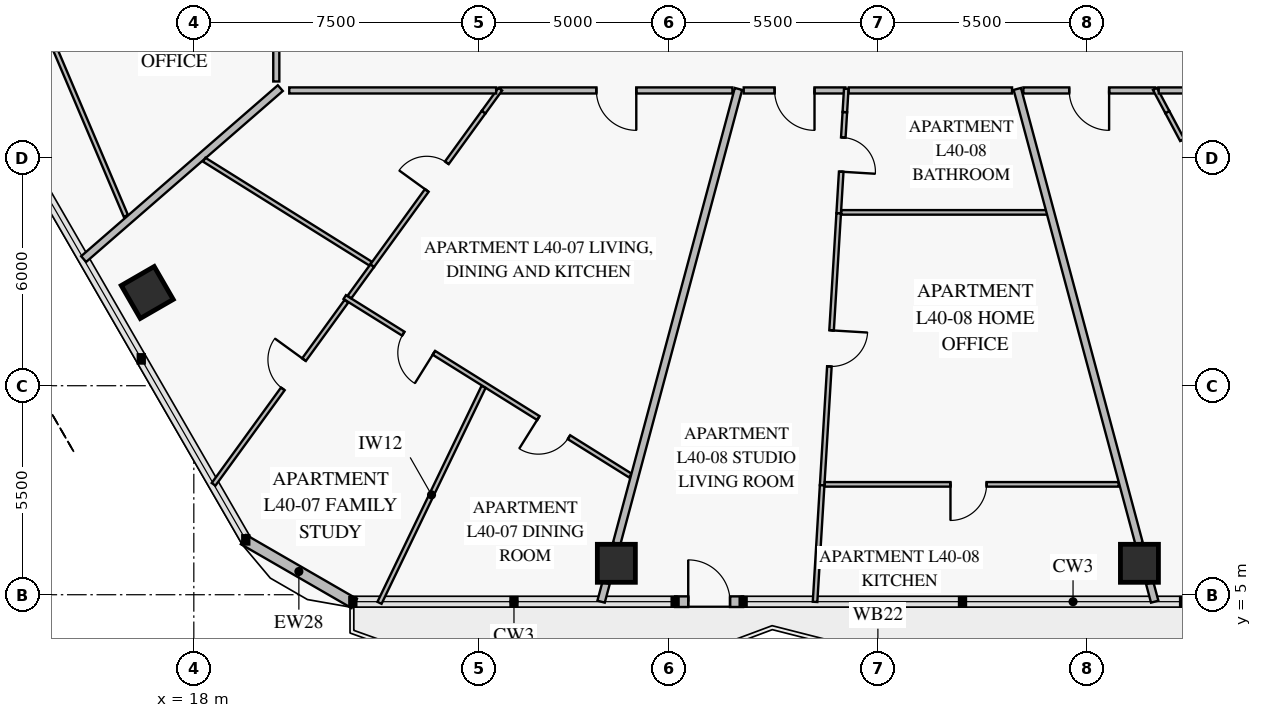
"""IFC4 building model, lengths in metres.
Left out: names, types, materials, properties, quantities, classifications, styles, units other than length and angle.
Written with IfcOpenShell. Run it as: python <this file> out.ifc"""

import sys

from ifc_helpers import new_model, si_unit, direction, frame, frame_2d, origin, origin_2d, place, context, subcontext, project, spatial, rectangle, extrude, element, fill, save


model = new_model("IFC4")
c1 = context("Model", 3, precision=1e-05, world=origin(), true_north=direction((0.0, 1.0)))
c2 = subcontext(c1, "Body", "Model", "MODEL_VIEW")
j1 = project(units=[si_unit("LENGTHUNIT", "METRE"), si_unit("PLANEANGLEUNIT", "RADIAN")], contexts=[c1])
p1 = place(None, origin())
s1 = spatial("IfcSite", under=j1, at=p1, CompositionType="ELEMENT")
p2 = place(p1, origin())
s2 = spatial("IfcBuilding", under=s1, at=p2, CompositionType="ELEMENT")
p3 = place(p2, frame((0.0, 0.0, 161.8)))
s3 = spatial("IfcBuildingStorey", under=s2, at=p3, CompositionType="ELEMENT", Elevation=161.8)
for number, where, z_axis, x_axis in (
    (1, (16.774, 12.953, 0.0), (0.0, 0.0, 1.0), (0.5, -0.866, 0.0)),
    (2, (29.118, 5.827, 0.0), (0.0, 0.0, 1.0), (1.0, 0.0, 0.0)),
    (3, (42.882, 5.827, 0.0), (0.0, 0.0, 1.0), (1.0, 0.0, 0.0)),
):
    element("IfcColumn", number, at=place(p3, frame(where, z_axis=z_axis, x_axis=x_axis)), inside=s3, PredefinedType="COLUMN", context=c2, shape_type="SweptSolid", body=[
        extrude(rectangle(XDim=1.0, YDim=1.0, at=origin_2d()), origin(), (0.0, 0.0, 1.0), 3.55),
    ])
p4 = place(p3, frame((32.454, 4.817, 0.0), z_axis=(0.0, 0.0, 1.0), x_axis=(-1.0, 0.0, 0.0)))
e4 = element("IfcWall", 4, at=p4, inside=s3, PredefinedType="SOLIDWALL", context=c2, shape_type="SweptSolid", body=[
    extrude(rectangle(XDim=1.79, YDim=0.28, at=frame_2d((0.895, 0.0))), origin(), (0.0, 0.0, 1.0), 3.55),
])
p5 = place(p4, frame((0.345, 0.0, 0.0)))
e5 = element("IfcOpeningElement", 5, at=p5, cuts=e4, PredefinedType="OPENING", context=c2, shape_type="SweptSolid", body=[
    extrude(rectangle(XDim=1.1, YDim=2.2, at=frame_2d((0.55, 1.1))), frame((0.0, 0.152, 0.0), z_axis=(0.0, -1.0, 0.0), x_axis=(1.0, 0.0, 0.0)), (0.0, 0.0, 1.0), 0.304),
])
p6 = place(p3, frame((22.221, 4.769, 0.0), z_axis=(0.0, 0.0, 1.0), x_axis=(-0.866020068361, 0.500009241111, 0.0)))
e6 = element("IfcWall", 6, at=p6, inside=s3, PredefinedType="SOLIDWALL", context=c2, shape_type="SweptSolid", body=[
    extrude(rectangle(XDim=3.365, YDim=0.28, at=frame_2d((1.683, 0.0))), origin(), (0.0, 0.0, 1.0), 3.55),
])
p7 = place(p3, frame((12.42, 23.901, 0.0), z_axis=(0.0, 0.0, 1.0), x_axis=(0.390728803852, -0.920505840199, 0.0)))
e7 = element("IfcWall", 7, at=p7, inside=s3, PredefinedType="PARTITIONING", context=c2, shape_type="SweptSolid", body=[
    extrude(rectangle(XDim=9.704, YDim=0.12, at=frame_2d((4.852, 0.0))), origin(), (0.0, 0.0, 1.0), 3.55),
])
p8 = place(p7, frame((2.533, 0.0, 0.0)))
e8 = element("IfcOpeningElement", 8, at=p8, cuts=e7, PredefinedType="OPENING", context=c2, shape_type="SweptSolid", body=[
    extrude(rectangle(XDim=0.95, YDim=2.1, at=frame_2d((0.475, 1.05))), frame((0.0, 0.072, 0.0), z_axis=(0.0, -1.0, 0.0), x_axis=(1.0, 0.0, 0.0)), (0.0, 0.0, 1.0), 0.144),
])
p9 = place(p3, frame((21.971, 12.833, 0.0), z_axis=(0.0, 0.0, 1.0), x_axis=(0.84804473337, -0.529924645779, 0.0)))
e9 = element("IfcWall", 9, at=p9, inside=s3, PredefinedType="PARTITIONING", context=c2, shape_type="SweptSolid", body=[
    extrude(rectangle(XDim=8.862, YDim=0.12, at=frame_2d((4.431, 0.0))), origin(), (0.0, 0.0, 1.0), 3.55),
])
p10 = place(p9, frame((1.817, 0.0, 0.0)))
e10 = element("IfcOpeningElement", 10, at=p10, cuts=e9, PredefinedType="OPENING", context=c2, shape_type="SweptSolid", body=[
    extrude(rectangle(XDim=0.95, YDim=2.1, at=frame_2d((0.475, 1.05))), frame((0.0, 0.072, 0.0), z_axis=(0.0, -1.0, 0.0), x_axis=(1.0, 0.0, 0.0)), (0.0, 0.0, 1.0), 0.144),
])
p11 = place(p9, frame((6.007, 0.0, 0.0)))
e11 = element("IfcOpeningElement", 11, at=p11, cuts=e9, PredefinedType="OPENING", context=c2, shape_type="SweptSolid", body=[
    extrude(rectangle(XDim=0.95, YDim=2.1, at=frame_2d((0.475, 1.05))), frame((0.0, 0.072, 0.0), z_axis=(0.0, -1.0, 0.0), x_axis=(1.0, 0.0, 0.0)), (0.0, 0.0, 1.0), 0.144),
])
p12 = place(p3, frame((25.626, 17.7, 0.0), z_axis=(0.0, 0.0, 1.0), x_axis=(-0.587247080924, -0.809407725406, 0.0)))
e12 = element("IfcWall", 12, at=p12, inside=s3, PredefinedType="PARTITIONING", context=c2, shape_type="SweptSolid", body=[
    extrude(rectangle(XDim=4.995, YDim=0.12, at=frame_2d((2.497, 0.0))), origin(), (0.0, 0.0, 1.0), 3.55),
])
p13 = place(p12, frame((1.648, 0.0, 0.0)))
e13 = element("IfcOpeningElement", 13, at=p13, cuts=e12, PredefinedType="OPENING", context=c2, shape_type="SweptSolid", body=[
    extrude(rectangle(XDim=0.9, YDim=2.1, at=frame_2d((0.45, 1.05))), frame((0.0, 0.072, 0.0), z_axis=(0.0, -1.0, 0.0), x_axis=(1.0, 0.0, 0.0)), (0.0, 0.0, 1.0), 0.144),
])
p14 = place(p3, frame((22.693, 13.657, 0.0), z_axis=(0.0, 0.0, 1.0), x_axis=(-0.587243042338, -0.809410655493, 0.0)))
e14 = element("IfcWall", 14, at=p14, inside=s3, PredefinedType="PARTITIONING", context=c2, shape_type="SweptSolid", body=[
    extrude(rectangle(XDim=1.017, YDim=0.12, at=frame_2d((0.508, 0.0))), origin(), (0.0, 0.0, 1.0), 3.55),
])
p15 = place(p3, frame((22.016, 12.724, 0.0), z_axis=(0.0, 0.0, 1.0), x_axis=(-0.587215499047, -0.809430637967, 0.0)))
e15 = element("IfcWall", 15, at=p15, inside=s3, PredefinedType="PARTITIONING", context=c2, shape_type="SweptSolid", body=[
    extrude(rectangle(XDim=5.954, YDim=0.12, at=frame_2d((2.977, 0.0))), origin(), (0.0, 0.0, 1.0), 2.87),
])
p16 = place(p15, frame((1.9, 0.0, 0.0)))
e16 = element("IfcOpeningElement", 16, at=p16, cuts=e15, PredefinedType="OPENING", context=c2, shape_type="SweptSolid", body=[
    extrude(rectangle(XDim=0.95, YDim=2.1, at=frame_2d((0.475, 1.05))), frame((0.0, 0.072, 0.0), z_axis=(0.0, -1.0, 0.0), x_axis=(1.0, 0.0, 0.0)), (0.0, 0.0, 1.0), 0.144),
])
p17 = place(p3, frame((26.064, 18.27, 0.0), z_axis=(0.0, 0.0, 1.0), x_axis=(1.0, 0.0, 0.0)))
e17 = element("IfcWall", 17, at=p17, inside=s3, PredefinedType="PARTITIONING", context=c2, shape_type="SweptSolid", body=[
    extrude(rectangle(XDim=6.108, YDim=0.16, at=frame_2d((3.054, 0.0))), origin(), (0.0, 0.0, 1.0), 3.55),
])
p18 = place(p17, frame((2.529, 0.0, 0.0)))
e18 = element("IfcOpeningElement", 18, at=p18, cuts=e17, PredefinedType="OPENING", context=c2, shape_type="SweptSolid", body=[
    extrude(rectangle(XDim=1.05, YDim=2.15, at=frame_2d((0.525, 1.075))), frame((0.0, 0.092, 0.0), z_axis=(0.0, -1.0, 0.0), x_axis=(1.0, 0.0, 0.0)), (0.0, 0.0, 1.0), 0.184),
])
p19 = place(p3, frame((35.13, 17.7, 0.0), z_axis=(0.0, 0.0, 1.0), x_axis=(-0.060658034447, -0.998158606063, 0.0)))
e19 = element("IfcWall", 19, at=p19, inside=s3, PredefinedType="PARTITIONING", context=c2, shape_type="SweptSolid", body=[
    extrude(rectangle(XDim=2.668, YDim=0.12, at=frame_2d((1.334, 0.0))), origin(), (0.0, 0.0, 1.0), 3.55),
])
p20 = place(p19, frame((0.671, 0.0, 0.0)))
e20 = element("IfcOpeningElement", 20, at=p20, cuts=e19, PredefinedType="OPENING", context=c2, shape_type="SweptSolid", body=[
    extrude(rectangle(XDim=0.9, YDim=2.1, at=frame_2d((0.45, 1.05))), frame((0.0, 0.072, 0.0), z_axis=(0.0, -1.0, 0.0), x_axis=(1.0, 0.0, 0.0)), (0.0, 0.0, 1.0), 0.144),
])
p21 = place(p3, frame((34.969, 15.036, 0.0), z_axis=(0.0, 0.0, 1.0), x_axis=(-0.060709915427, -0.998155451906, 0.0)))
e21 = element("IfcWall", 21, at=p21, inside=s3, PredefinedType="PARTITIONING", context=c2, shape_type="SweptSolid", body=[
    extrude(rectangle(XDim=7.17, YDim=0.12, at=frame_2d((3.585, 0.0))), origin(), (0.0, 0.0, 1.0), 3.15),
])
p22 = place(p21, frame((3.085, 0.0, 0.0)))
e22 = element("IfcOpeningElement", 22, at=p22, cuts=e21, PredefinedType="OPENING", context=c2, shape_type="SweptSolid", body=[
    extrude(rectangle(XDim=0.95, YDim=2.1, at=frame_2d((0.475, 1.05))), frame((0.0, 0.072, 0.0), z_axis=(0.0, -1.0, 0.0), x_axis=(1.0, 0.0, 0.0)), (0.0, 0.0, 1.0), 0.144),
])
p23 = place(p3, frame((34.603, 7.904, 0.0), z_axis=(0.0, 0.0, 1.0), x_axis=(1.0, 0.0, 0.0)))
e23 = element("IfcWall", 23, at=p23, inside=s3, PredefinedType="PARTITIONING", context=c2, shape_type="SweptSolid", body=[
    extrude(rectangle(XDim=7.732, YDim=0.12, at=frame_2d((3.866, 0.0))), origin(), (0.0, 0.0, 1.0), 2.9),
])
p24 = place(p23, frame((3.307, 0.0, 0.0)))
e24 = element("IfcOpeningElement", 24, at=p24, cuts=e23, PredefinedType="OPENING", context=c2, shape_type="SweptSolid", body=[
    extrude(rectangle(XDim=0.95, YDim=2.1, at=frame_2d((0.475, 1.05))), frame((0.0, 0.072, 0.0), z_axis=(0.0, -1.0, 0.0), x_axis=(1.0, 0.0, 0.0)), (0.0, 0.0, 1.0), 0.144),
])
p25 = place(p3, frame((32.47, 18.27, 0.0), z_axis=(0.0, 0.0, 1.0), x_axis=(1.0, 0.0, 0.0)))
e25 = element("IfcWall", 25, at=p25, inside=s3, PredefinedType="PARTITIONING", context=c2, shape_type="SweptSolid", body=[
    extrude(rectangle(XDim=2.675, YDim=0.16, at=frame_2d((1.338, 0.0))), origin(), (0.0, 0.0, 1.0), 2.9),
])
p26 = place(p25, frame((0.812, 0.0, 0.0)))
e26 = element("IfcOpeningElement", 26, at=p26, cuts=e25, PredefinedType="OPENING", context=c2, shape_type="SweptSolid", body=[
    extrude(rectangle(XDim=1.05, YDim=2.15, at=frame_2d((0.525, 1.075))), frame((0.0, 0.092, 0.0), z_axis=(0.0, -1.0, 0.0), x_axis=(1.0, 0.0, 0.0)), (0.0, 0.0, 1.0), 0.184),
])
p27 = place(p3, frame((43.616, 17.7, 0.0), z_axis=(0.0, 0.0, 1.0), x_axis=(0.470139063633, -0.882592352588, 0.0)))
e27 = element("IfcWall", 27, at=p27, inside=s3, PredefinedType="PARTITIONING", context=c2, shape_type="SweptSolid", body=[
    extrude(rectangle(XDim=3.047, YDim=0.12, at=frame_2d((1.523, 0.0))), origin(), (0.0, 0.0, 1.0), 3.55),
])
p28 = place(p27, frame((0.83, 0.0, 0.0)))
e28 = element("IfcOpeningElement", 28, at=p28, cuts=e27, PredefinedType="OPENING", context=c2, shape_type="SweptSolid", body=[
    extrude(rectangle(XDim=0.9, YDim=2.1, at=frame_2d((0.45, 1.05))), frame((0.0, 0.072, 0.0), z_axis=(0.0, -1.0, 0.0), x_axis=(1.0, 0.0, 0.0)), (0.0, 0.0, 1.0), 0.144),
])
p29 = place(p3, frame((39.828, 18.27, 0.0), z_axis=(0.0, 0.0, 1.0), x_axis=(1.0, 0.0, 0.0)))
e29 = element("IfcWall", 29, at=p29, inside=s3, PredefinedType="PARTITIONING", context=c2, shape_type="SweptSolid", body=[
    extrude(rectangle(XDim=3.462, YDim=0.16, at=frame_2d((1.731, 0.0))), origin(), (0.0, 0.0, 1.0), 3.55),
])
p30 = place(p29, frame((1.206, 0.0, 0.0)))
e30 = element("IfcOpeningElement", 30, at=p30, cuts=e29, PredefinedType="OPENING", context=c2, shape_type="SweptSolid", body=[
    extrude(rectangle(XDim=1.05, YDim=2.15, at=frame_2d((0.525, 1.075))), frame((0.0, 0.092, 0.0), z_axis=(0.0, -1.0, 0.0), x_axis=(1.0, 0.0, 0.0)), (0.0, 0.0, 1.0), 0.184),
])
p31 = place(p3, frame((20.276, 18.331, 0.0), z_axis=(0.0, 0.0, 1.0), x_axis=(-0.754712052901, -0.656056184489, 0.0)))
e31 = element("IfcWall", 31, at=p31, inside=s3, PredefinedType="PARTITIONING", context=c2, shape_type="SweptSolid", body=[
    extrude(rectangle(XDim=6.857, YDim=0.2, at=frame_2d((3.429, 0.0))), origin(), (0.0, 0.0, 1.0), 2.87),
])
p32 = place(p3, frame((25.624, 10.469, 0.0), z_axis=(0.0, 0.0, 1.0), x_axis=(-0.434146084621, -0.900842481907, 0.0)))
e32 = element("IfcWall", 32, at=p32, inside=s3, PredefinedType="PARTITIONING", context=c2, shape_type="SweptSolid", body=[
    extrude(rectangle(XDim=6.308, YDim=0.12, at=frame_2d((3.154, 0.0))), origin(), (0.0, 0.0, 1.0), 2.87),
])
p33 = place(p3, frame((26.064, 18.304, 0.0), z_axis=(0.0, 0.0, 1.0), x_axis=(-0.587257034721, -0.809400503565, 0.0)))
e33 = element("IfcWall", 33, at=p33, inside=s3, PredefinedType="PARTITIONING", context=c2, shape_type="SweptSolid", body=[
    extrude(rectangle(XDim=0.746, YDim=0.12, at=frame_2d((0.373, 0.0))), origin(), (0.0, 0.0, 1.0), 3.55),
])
p34 = place(p3, frame((18.274, 16.448, 0.0), z_axis=(0.0, 0.0, 1.0), x_axis=(0.848038174334, -0.529935142138, 0.0)))
e34 = element("IfcWall", 34, at=p34, inside=s3, PredefinedType="PARTITIONING", context=c2, shape_type="SweptSolid", body=[
    extrude(rectangle(XDim=5.16, YDim=0.12, at=frame_2d((2.58, 0.0))), origin(), (0.0, 0.0, 1.0), 2.9),
])
p35 = place(p3, frame((32.332, 18.31, 0.0), z_axis=(0.0, 0.0, 1.0), x_axis=(-0.258823121138, -0.96592473411, 0.0)))
e35 = element("IfcWall", 35, at=p35, inside=s3, PredefinedType="PARTITIONING", context=c2, shape_type="SweptSolid", body=[
    extrude(rectangle(XDim=12.385, YDim=0.2, at=frame_2d((6.193, 0.0))), origin(), (0.0, 0.0, 1.0), 2.9),
])
p36 = place(p3, frame((28.848, 5.307, 0.0), z_axis=(0.0, 0.0, 1.0), x_axis=(-0.258920510492, -0.965898633008, 0.0)))
e36 = element("IfcWall", 36, at=p36, inside=s3, PredefinedType="PARTITIONING", context=c2, shape_type="SweptSolid", body=[
    extrude(rectangle(XDim=0.507, YDim=0.2, at=frame_2d((0.254, 0.0))), origin(), (0.0, 0.0, 1.0), 3.55),
])
p37 = place(p3, frame((35.168, 18.315, 0.0), z_axis=(0.0, 0.0, 1.0), x_axis=(-0.060626660722, -0.998160512147, 0.0)))
e37 = element("IfcWall", 37, at=p37, inside=s3, PredefinedType="PARTITIONING", context=c2, shape_type="SweptSolid", body=[
    extrude(rectangle(XDim=0.616, YDim=0.12, at=frame_2d((0.308, 0.0))), origin(), (0.0, 0.0, 1.0), 3.55),
])
p38 = place(p3, frame((34.533, 7.879, 0.0), z_axis=(0.0, 0.0, 1.0), x_axis=(-0.060696544612, -0.998156265057, 0.0)))
e38 = element("IfcWall", 38, at=p38, inside=s3, PredefinedType="PARTITIONING", context=c2, shape_type="SweptSolid", body=[
    extrude(rectangle(XDim=3.073, YDim=0.12, at=frame_2d((1.537, 0.0))), origin(), (0.0, 0.0, 1.0), 2.87),
])
p39 = place(p3, frame((35.038, 15.061, 0.0), z_axis=(0.0, 0.0, 1.0), x_axis=(1.0, 0.0, 0.0)))
e39 = element("IfcWall", 39, at=p39, inside=s3, PredefinedType="PARTITIONING", context=c2, shape_type="SweptSolid", body=[
    extrude(rectangle(XDim=5.446, YDim=0.12, at=frame_2d((2.723, 0.0))), origin(), (0.0, 0.0, 1.0), 2.9),
])
p40 = place(p3, frame((39.668, 18.31, 0.0), z_axis=(0.0, 0.0, 1.0), x_axis=(0.258823121138, -0.96592473411, 0.0)))
e40 = element("IfcWall", 40, at=p40, inside=s3, PredefinedType="PARTITIONING", context=c2, shape_type="SweptSolid", body=[
    extrude(rectangle(XDim=12.385, YDim=0.2, at=frame_2d((6.193, 0.0))), origin(), (0.0, 0.0, 1.0), 2.9),
])
p41 = place(p3, frame((43.152, 5.307, 0.0), z_axis=(0.0, 0.0, 1.0), x_axis=(0.258920510492, -0.965898633008, 0.0)))
e41 = element("IfcWall", 41, at=p41, inside=s3, PredefinedType="PARTITIONING", context=c2, shape_type="SweptSolid", body=[
    extrude(rectangle(XDim=0.507, YDim=0.2, at=frame_2d((0.254, 0.0))), origin(), (0.0, 0.0, 1.0), 3.55),
])
p42 = place(p3, frame((43.29, 18.312, 0.0), z_axis=(0.0, 0.0, 1.0), x_axis=(0.470021649014, -0.882654886951, 0.0)))
e42 = element("IfcWall", 42, at=p42, inside=s3, PredefinedType="PARTITIONING", context=c2, shape_type="SweptSolid", body=[
    extrude(rectangle(XDim=0.693, YDim=0.12, at=frame_2d((0.347, 0.0))), origin(), (0.0, 0.0, 1.0), 3.55),
])
p43 = place(p3, frame((20.17, 21.871, 0.0), z_axis=(0.0, 0.0, 1.0), x_axis=(0.0, -1.0, 0.0)))
e43 = element("IfcWall", 43, at=p43, inside=s3, PredefinedType="PARTITIONING", context=c2, shape_type="SweptSolid", body=[
    extrude(rectangle(XDim=3.365, YDim=0.16, at=frame_2d((1.682, 0.0))), origin(), (0.0, 0.0, 1.0), 3.15),
])
p44 = place(p3, frame((20.511, 18.27, 0.0), z_axis=(0.0, 0.0, 1.0), x_axis=(1.0, 0.0, 0.0)))
e44 = element("IfcWall", 44, at=p44, inside=s3, PredefinedType="PARTITIONING", context=c2, shape_type="SweptSolid", body=[
    extrude(rectangle(XDim=5.444, YDim=0.16, at=frame_2d((2.722, 0.0))), origin(), (0.0, 0.0, 1.0), 2.9),
])
p45 = place(p3, frame((35.233, 18.27, 0.0), z_axis=(0.0, 0.0, 1.0), x_axis=(1.0, 0.0, 0.0)))
e45 = element("IfcWall", 45, at=p45, inside=s3, PredefinedType="PARTITIONING", context=c2, shape_type="SweptSolid", body=[
    extrude(rectangle(XDim=4.297, YDim=0.16, at=frame_2d((2.148, 0.0))), origin(), (0.0, 0.0, 1.0), 2.9),
])
p46 = place(p3, frame((43.39, 18.27, 0.0), z_axis=(0.0, 0.0, 1.0), x_axis=(1.0, 0.0, 0.0)))
e46 = element("IfcWall", 46, at=p46, inside=s3, PredefinedType="PARTITIONING", context=c2, shape_type="SweptSolid", body=[
    extrude(rectangle(XDim=6.7, YDim=0.16, at=frame_2d((3.35, 0.0))), origin(), (0.0, 0.0, 1.0), 2.9),
])
p47 = place(p5, frame((1.1, 0.0, 0.0), z_axis=(0.0, 0.0, 1.0), x_axis=(-1.0, 0.0, 0.0)))
e47 = element("IfcDoor", 47, at=p47, inside=s3, OperationType="SINGLE_SWING_LEFT", PredefinedType="DOOR", context=c2, shape_type="SweptSolid", body=[
    extrude(rectangle(XDim=1.1, YDim=2.2, at=frame_2d((0.55, 1.1))), frame((0.0, 0.025, 0.0), z_axis=(0.0, -1.0, 0.0), x_axis=(1.0, 0.0, 0.0)), (0.0, 0.0, 1.0), 0.05),
])
fill(e5, e47)
p48 = place(p10, frame((0.95, 0.0, 0.0), z_axis=(0.0, 0.0, 1.0), x_axis=(-1.0, 0.0, 0.0)))
e48 = element("IfcDoor", 48, at=p48, inside=s3, OperationType="SINGLE_SWING_LEFT", PredefinedType="DOOR", context=c2, shape_type="SweptSolid", body=[
    extrude(rectangle(XDim=0.95, YDim=2.1, at=frame_2d((0.475, 1.05))), frame((0.0, 0.025, 0.0), z_axis=(0.0, -1.0, 0.0), x_axis=(1.0, 0.0, 0.0)), (0.0, 0.0, 1.0), 0.05),
])
fill(e10, e48)
p49 = place(p11, frame((0.95, 0.0, 0.0), z_axis=(0.0, 0.0, 1.0), x_axis=(-1.0, 0.0, 0.0)))
e49 = element("IfcDoor", 49, at=p49, inside=s3, OperationType="SINGLE_SWING_RIGHT", PredefinedType="DOOR", context=c2, shape_type="SweptSolid", body=[
    extrude(rectangle(XDim=0.95, YDim=2.1, at=frame_2d((0.475, 1.05))), frame((0.0, 0.025, 0.0), z_axis=(0.0, -1.0, 0.0), x_axis=(1.0, 0.0, 0.0)), (0.0, 0.0, 1.0), 0.05),
])
fill(e11, e49)
p50 = place(p13, frame((0.9, 0.0, 0.0), z_axis=(0.0, 0.0, 1.0), x_axis=(-1.0, 0.0, 0.0)))
e50 = element("IfcDoor", 50, at=p50, inside=s3, OperationType="SINGLE_SWING_LEFT", PredefinedType="DOOR", context=c2, shape_type="SweptSolid", body=[
    extrude(rectangle(XDim=0.9, YDim=2.1, at=frame_2d((0.45, 1.05))), frame((0.0, 0.025, 0.0), z_axis=(0.0, -1.0, 0.0), x_axis=(1.0, 0.0, 0.0)), (0.0, 0.0, 1.0), 0.05),
])
fill(e13, e50)
p51 = place(p16, frame((0.95, 0.0, 0.0), z_axis=(0.0, 0.0, 1.0), x_axis=(-1.0, 0.0, 0.0)))
e51 = element("IfcDoor", 51, at=p51, inside=s3, OperationType="SINGLE_SWING_RIGHT", PredefinedType="DOOR", context=c2, shape_type="SweptSolid", body=[
    extrude(rectangle(XDim=0.95, YDim=2.1, at=frame_2d((0.475, 1.05))), frame((0.0, 0.025, 0.0), z_axis=(0.0, -1.0, 0.0), x_axis=(1.0, 0.0, 0.0)), (0.0, 0.0, 1.0), 0.05),
])
fill(e16, e51)
p52 = place(p18, frame((1.05, 0.0, 0.0), z_axis=(0.0, 0.0, 1.0), x_axis=(-1.0, 0.0, 0.0)))
e52 = element("IfcDoor", 52, at=p52, inside=s3, OperationType="SINGLE_SWING_LEFT", PredefinedType="DOOR", context=c2, shape_type="SweptSolid", body=[
    extrude(rectangle(XDim=1.05, YDim=2.15, at=frame_2d((0.525, 1.075))), frame((0.0, 0.025, 0.0), z_axis=(0.0, -1.0, 0.0), x_axis=(1.0, 0.0, 0.0)), (0.0, 0.0, 1.0), 0.05),
])
fill(e18, e52)
p53 = place(p20, origin())
e53 = element("IfcDoor", 53, at=p53, inside=s3, OperationType="SINGLE_SWING_RIGHT", PredefinedType="DOOR", context=c2, shape_type="SweptSolid", body=[
    extrude(rectangle(XDim=0.9, YDim=2.1, at=frame_2d((0.45, 1.05))), frame((0.0, 0.025, 0.0), z_axis=(0.0, -1.0, 0.0), x_axis=(1.0, 0.0, 0.0)), (0.0, 0.0, 1.0), 0.05),
])
fill(e20, e53)
p54 = place(p22, origin())
e54 = element("IfcDoor", 54, at=p54, inside=s3, OperationType="SINGLE_SWING_LEFT", PredefinedType="DOOR", context=c2, shape_type="SweptSolid", body=[
    extrude(rectangle(XDim=0.95, YDim=2.1, at=frame_2d((0.475, 1.05))), frame((0.0, 0.025, 0.0), z_axis=(0.0, -1.0, 0.0), x_axis=(1.0, 0.0, 0.0)), (0.0, 0.0, 1.0), 0.05),
])
fill(e22, e54)
p55 = place(p24, frame((0.95, 0.0, 0.0), z_axis=(0.0, 0.0, 1.0), x_axis=(-1.0, 0.0, 0.0)))
e55 = element("IfcDoor", 55, at=p55, inside=s3, OperationType="SINGLE_SWING_RIGHT", PredefinedType="DOOR", context=c2, shape_type="SweptSolid", body=[
    extrude(rectangle(XDim=0.95, YDim=2.1, at=frame_2d((0.475, 1.05))), frame((0.0, 0.025, 0.0), z_axis=(0.0, -1.0, 0.0), x_axis=(1.0, 0.0, 0.0)), (0.0, 0.0, 1.0), 0.05),
])
fill(e24, e55)
p56 = place(p26, frame((1.05, 0.0, 0.0), z_axis=(0.0, 0.0, 1.0), x_axis=(-1.0, 0.0, 0.0)))
e56 = element("IfcDoor", 56, at=p56, inside=s3, OperationType="SINGLE_SWING_LEFT", PredefinedType="DOOR", context=c2, shape_type="SweptSolid", body=[
    extrude(rectangle(XDim=1.05, YDim=2.15, at=frame_2d((0.525, 1.075))), frame((0.0, 0.025, 0.0), z_axis=(0.0, -1.0, 0.0), x_axis=(1.0, 0.0, 0.0)), (0.0, 0.0, 1.0), 0.05),
])
fill(e26, e56)
p57 = place(p28, origin())
e57 = element("IfcDoor", 57, at=p57, inside=s3, OperationType="SINGLE_SWING_RIGHT", PredefinedType="DOOR", context=c2, shape_type="SweptSolid", body=[
    extrude(rectangle(XDim=0.9, YDim=2.1, at=frame_2d((0.45, 1.05))), frame((0.0, 0.025, 0.0), z_axis=(0.0, -1.0, 0.0), x_axis=(1.0, 0.0, 0.0)), (0.0, 0.0, 1.0), 0.05),
])
fill(e28, e57)
p58 = place(p30, frame((1.05, 0.0, 0.0), z_axis=(0.0, 0.0, 1.0), x_axis=(-1.0, 0.0, 0.0)))
e58 = element("IfcDoor", 58, at=p58, inside=s3, OperationType="SINGLE_SWING_LEFT", PredefinedType="DOOR", context=c2, shape_type="SweptSolid", body=[
    extrude(rectangle(XDim=1.05, YDim=2.15, at=frame_2d((0.525, 1.075))), frame((0.0, 0.025, 0.0), z_axis=(0.0, -1.0, 0.0), x_axis=(1.0, 0.0, 0.0)), (0.0, 0.0, 1.0), 0.05),
])
fill(e30, e58)
save(model, sys.argv[1])
